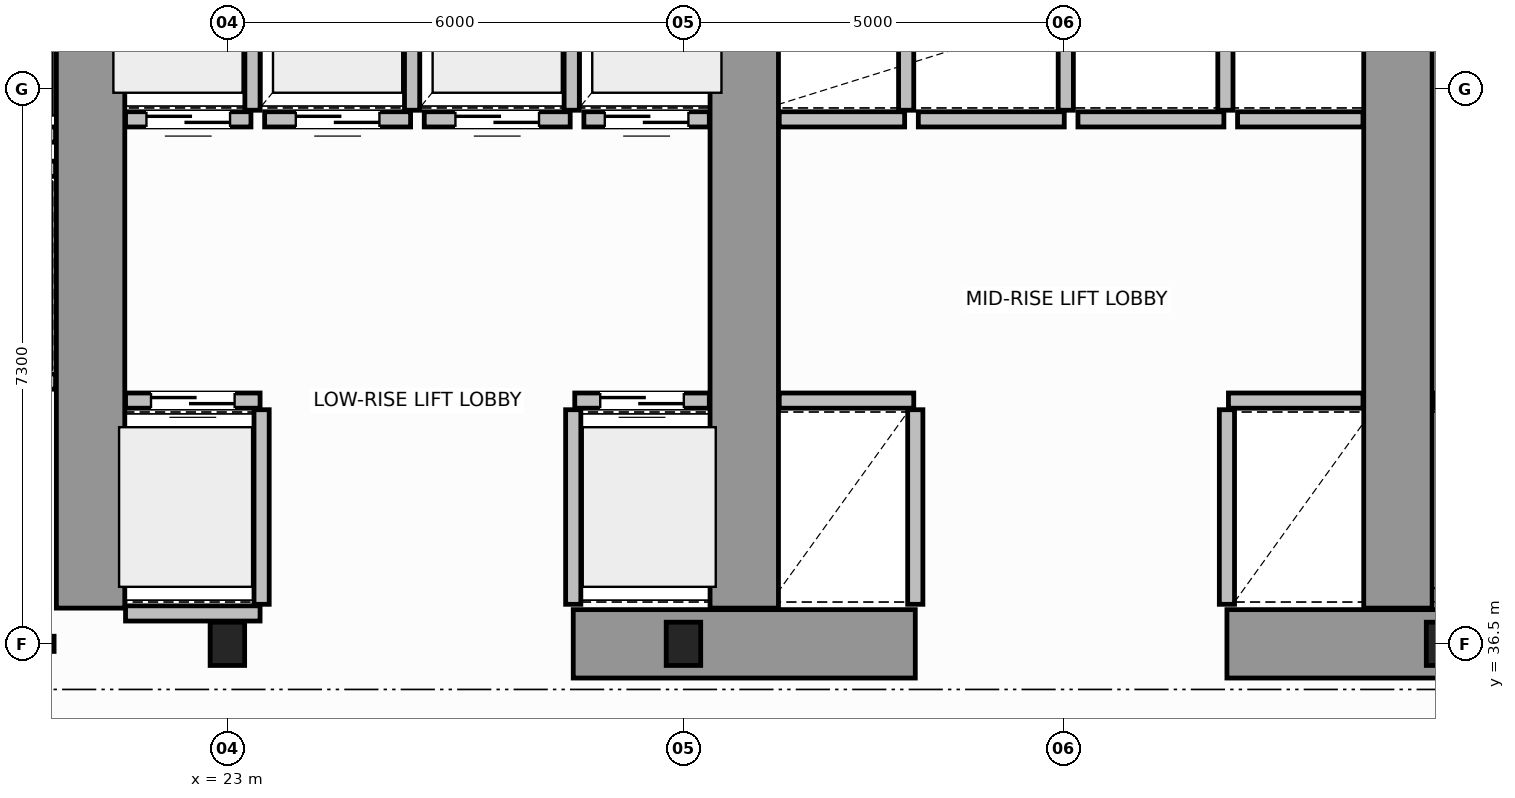
"""IFC4 building model, lengths in metres.
Left out: names, types, materials, properties, quantities, classifications, styles, units other than length and angle.
Written with IfcOpenShell. Run it as: python <this file> out.ifc"""

import sys

from ifc_helpers import new_model, si_unit, direction, frame, frame_2d, origin, origin_2d, place, context, subcontext, project, spatial, rectangle, i_section, extrude, source, transform, mapped, element, fill, save


model = new_model("IFC4")
c1 = context("Model", 3, precision=1e-05, world=origin(), true_north=direction((0.0, 1.0)))
c2 = subcontext(c1, "Body", "Model", "MODEL_VIEW")
j1 = project(units=[si_unit("LENGTHUNIT", "METRE"), si_unit("PLANEANGLEUNIT", "RADIAN")], contexts=[c1])
p1 = place(None, origin())
s1 = spatial("IfcSite", under=j1, at=p1, CompositionType="ELEMENT")
p2 = place(p1, origin())
s2 = spatial("IfcBuilding", under=s1, at=p2, CompositionType="ELEMENT")
p3 = place(p2, frame((0.0, 0.0, 26.4)))
s3 = spatial("IfcBuildingStorey", under=s2, at=p3, CompositionType="ELEMENT", Elevation=26.4)
m1 = source(origin(), c2, "Body", "SweptSolid", [
    extrude(i_section(OverallWidth=0.454, OverallDepth=0.569, WebThickness=0.078, FlangeThickness=0.08, FilletRadius=0.015, at=origin_2d()), origin(), (0.0, 0.0, 1.0), 3.8),
])
for number, where, z_axis, x_axis in (
    (1, (23.0, 36.5, 0.0), (0.0, 0.0, 1.0), (1.0, 0.0, 0.0)),
    (2, (29.0, 36.5, 0.0), (0.0, 0.0, 1.0), (1.0, 0.0, 0.0)),
    (3, (39.0, 36.5, 0.0), (0.0, 0.0, 1.0), (1.0, 0.0, 0.0)),
):
    element("IfcColumn", number, at=place(p3, frame(where, z_axis=z_axis, x_axis=x_axis)), inside=s3, PredefinedType="COLUMN", context=c2, shape_type="MappedRepresentation", body=[
        mapped(m1, transform((0.0, 0.0, 0.0), scale=1.0)),
    ])
for number, where, z_axis, x_axis in (
    (4, (27.55, 36.5, 0.0), (0.0, 0.0, 1.0), (1.0, 0.0, 0.0)),
    (5, (36.15, 36.5, 0.0), (0.0, 0.0, 1.0), (1.0, 0.0, 0.0)),
):
    element("IfcWall", number, at=place(p3, frame(where, z_axis=z_axis, x_axis=x_axis)), inside=s3, PredefinedType="SHEAR", context=c2, shape_type="SweptSolid", body=[
        extrude(rectangle(XDim=4.5, YDim=0.9, at=frame_2d((2.25, 0.0))), origin(), (0.0, 0.0, 1.0), 3.8),
    ])
for number, where, z_axis, x_axis in (
    (6, (21.2, 36.97, 0.0), (0.0, 0.0, 1.0), (0.0, 1.0, 0.0)),
    (7, (29.8, 36.97, 0.0), (0.0, 0.0, 1.0), (0.0, 1.0, 0.0)),
    (8, (38.4, 36.97, 0.0), (0.0, 0.0, 1.0), (0.0, 1.0, 0.0)),
):
    element("IfcWall", number, at=place(p3, frame(where, z_axis=z_axis, x_axis=x_axis)), inside=s3, PredefinedType="SHEAR", context=c2, shape_type="SweptSolid", body=[
        extrude(rectangle(XDim=9.23, YDim=0.9, at=frame_2d((4.615, 0.0))), origin(), (0.0, 0.0, 1.0), 3.8),
    ])
p4 = place(p3, frame((18.25, 36.5, 0.0), z_axis=(0.0, 0.0, 1.0), x_axis=(1.0, 0.0, 0.0)))
e9 = element("IfcWall", 9, at=p4, inside=s3, PredefinedType="SOLIDWALL", context=c2, shape_type="SweptSolid", body=[
    extrude(rectangle(XDim=2.47, YDim=0.2, at=frame_2d((1.235, 0.0))), origin(), (0.0, 0.0, 1.0), 2.37),
])
p5 = place(p4, frame((0.65, 0.0, 0.0)))
e10 = element("IfcOpeningElement", 10, at=p5, cuts=e9, PredefinedType="OPENING", context=c2, shape_type="SweptSolid", body=[
    extrude(rectangle(XDim=1.1, YDim=2.15, at=frame_2d((0.55, 1.075))), frame((0.0, 0.11, 0.0), z_axis=(0.0, -1.0, 0.0), x_axis=(1.0, 0.0, 0.0)), (0.0, 0.0, 1.0), 0.22),
])
p6 = place(p3, frame((21.66, 39.7, 0.0), z_axis=(0.0, 0.0, 1.0), x_axis=(1.0, 0.0, 0.0)))
e11 = element("IfcWall", 11, at=p6, inside=s3, PredefinedType="SOLIDWALL", context=c2, shape_type="SweptSolid", body=[
    extrude(rectangle(XDim=1.77, YDim=0.2, at=frame_2d((0.885, 0.0))), origin(), (0.0, 0.0, 1.0), 3.58),
])
p7 = place(p6, frame((0.335, 0.0, 0.0)))
e12 = element("IfcOpeningElement", 12, at=p7, cuts=e11, PredefinedType="OPENING", context=c2, shape_type="SweptSolid", body=[
    extrude(rectangle(XDim=1.1, YDim=2.15, at=frame_2d((0.55, 1.075))), frame((0.0, 0.11, 0.0), z_axis=(0.0, -1.0, 0.0), x_axis=(1.0, 0.0, 0.0)), (0.0, 0.0, 1.0), 0.22),
])
p8 = place(p3, frame((21.66, 36.9, 0.0), z_axis=(0.0, 0.0, 1.0), x_axis=(1.0, 0.0, 0.0)))
e13 = element("IfcWall", 13, at=p8, inside=s3, PredefinedType="SOLIDWALL", context=c2, shape_type="SweptSolid", body=[
    extrude(rectangle(XDim=1.77, YDim=0.2, at=frame_2d((0.885, 0.0))), origin(), (0.0, 0.0, 1.0), 2.37),
])
p9 = place(p3, frame((23.45, 37.02, 0.0), z_axis=(0.0, 0.0, 1.0), x_axis=(0.0, 1.0, 0.0)))
e14 = element("IfcWall", 14, at=p9, inside=s3, PredefinedType="SOLIDWALL", context=c2, shape_type="SweptSolid", body=[
    extrude(rectangle(XDim=2.56, YDim=0.2, at=frame_2d((1.28, 0.0))), origin(), (0.0, 0.0, 1.0), 3.58),
])
p10 = place(p3, frame((27.57, 39.7, 0.0), z_axis=(0.0, 0.0, 1.0), x_axis=(1.0, 0.0, 0.0)))
e15 = element("IfcWall", 15, at=p10, inside=s3, PredefinedType="SOLIDWALL", context=c2, shape_type="SweptSolid", body=[
    extrude(rectangle(XDim=1.77, YDim=0.2, at=frame_2d((0.885, 0.0))), origin(), (0.0, 0.0, 1.0), 3.58),
])
p11 = place(p10, frame((0.335, 0.0, 0.0)))
e16 = element("IfcOpeningElement", 16, at=p11, cuts=e15, PredefinedType="OPENING", context=c2, shape_type="SweptSolid", body=[
    extrude(rectangle(XDim=1.1, YDim=2.15, at=frame_2d((0.55, 1.075))), frame((0.0, 0.11, 0.0), z_axis=(0.0, -1.0, 0.0), x_axis=(1.0, 0.0, 0.0)), (0.0, 0.0, 1.0), 0.22),
])
p12 = place(p3, frame((27.55, 37.02, 0.0), z_axis=(0.0, 0.0, 1.0), x_axis=(0.0, 1.0, 0.0)))
e17 = element("IfcWall", 17, at=p12, inside=s3, PredefinedType="SOLIDWALL", context=c2, shape_type="SweptSolid", body=[
    extrude(rectangle(XDim=2.56, YDim=0.2, at=frame_2d((1.28, 0.0))), origin(), (0.0, 0.0, 1.0), 3.58),
])
p13 = place(p3, frame((21.66, 43.4, 0.0), z_axis=(0.0, 0.0, 1.0), x_axis=(1.0, 0.0, 0.0)))
e18 = element("IfcWall", 18, at=p13, inside=s3, PredefinedType="SOLIDWALL", context=c2, shape_type="SweptSolid", body=[
    extrude(rectangle(XDim=1.65, YDim=0.2, at=frame_2d((0.825, 0.0))), origin(), (0.0, 0.0, 1.0), 3.58),
])
p14 = place(p13, frame((0.275, 0.0, 0.0)))
e19 = element("IfcOpeningElement", 19, at=p14, cuts=e18, PredefinedType="OPENING", context=c2, shape_type="SweptSolid", body=[
    extrude(rectangle(XDim=1.1, YDim=2.15, at=frame_2d((0.55, 1.075))), frame((0.0, 0.11, 0.0), z_axis=(0.0, -1.0, 0.0), x_axis=(1.0, 0.0, 0.0)), (0.0, 0.0, 1.0), 0.22),
])
p15 = place(p3, frame((23.33, 43.52, 0.0), z_axis=(0.0, 0.0, 1.0), x_axis=(0.0, 1.0, 0.0)))
e20 = element("IfcWall", 20, at=p15, inside=s3, PredefinedType="SOLIDWALL", context=c2, shape_type="SweptSolid", body=[
    extrude(rectangle(XDim=2.56, YDim=0.2, at=frame_2d((1.28, 0.0))), origin(), (0.0, 0.0, 1.0), 3.58),
])
p16 = place(p3, frame((23.49, 43.4, 0.0), z_axis=(0.0, 0.0, 1.0), x_axis=(1.0, 0.0, 0.0)))
e21 = element("IfcWall", 21, at=p16, inside=s3, PredefinedType="SOLIDWALL", context=c2, shape_type="SweptSolid", body=[
    extrude(rectangle(XDim=1.92, YDim=0.2, at=frame_2d((0.96, 0.0))), origin(), (0.0, 0.0, 1.0), 3.58),
])
p17 = place(p16, frame((0.41, 0.0, 0.0)))
e22 = element("IfcOpeningElement", 22, at=p17, cuts=e21, PredefinedType="OPENING", context=c2, shape_type="SweptSolid", body=[
    extrude(rectangle(XDim=1.1, YDim=2.15, at=frame_2d((0.55, 1.075))), frame((0.0, 0.11, 0.0), z_axis=(0.0, -1.0, 0.0), x_axis=(1.0, 0.0, 0.0)), (0.0, 0.0, 1.0), 0.22),
])
p18 = place(p3, frame((25.43, 43.52, 0.0), z_axis=(0.0, 0.0, 1.0), x_axis=(0.0, 1.0, 0.0)))
e23 = element("IfcWall", 23, at=p18, inside=s3, PredefinedType="SOLIDWALL", context=c2, shape_type="SweptSolid", body=[
    extrude(rectangle(XDim=2.56, YDim=0.2, at=frame_2d((1.28, 0.0))), origin(), (0.0, 0.0, 1.0), 3.58),
])
p19 = place(p3, frame((25.59, 43.4, 0.0), z_axis=(0.0, 0.0, 1.0), x_axis=(1.0, 0.0, 0.0)))
e24 = element("IfcWall", 24, at=p19, inside=s3, PredefinedType="SOLIDWALL", context=c2, shape_type="SweptSolid", body=[
    extrude(rectangle(XDim=1.92, YDim=0.2, at=frame_2d((0.96, 0.0))), origin(), (0.0, 0.0, 1.0), 3.58),
])
p20 = place(p19, frame((0.41, 0.0, 0.0)))
e25 = element("IfcOpeningElement", 25, at=p20, cuts=e24, PredefinedType="OPENING", context=c2, shape_type="SweptSolid", body=[
    extrude(rectangle(XDim=1.1, YDim=2.15, at=frame_2d((0.55, 1.075))), frame((0.0, 0.11, 0.0), z_axis=(0.0, -1.0, 0.0), x_axis=(1.0, 0.0, 0.0)), (0.0, 0.0, 1.0), 0.22),
])
p21 = place(p3, frame((27.53, 43.52, 0.0), z_axis=(0.0, 0.0, 1.0), x_axis=(0.0, 1.0, 0.0)))
e26 = element("IfcWall", 26, at=p21, inside=s3, PredefinedType="SOLIDWALL", context=c2, shape_type="SweptSolid", body=[
    extrude(rectangle(XDim=2.56, YDim=0.2, at=frame_2d((1.28, 0.0))), origin(), (0.0, 0.0, 1.0), 3.58),
])
p22 = place(p3, frame((27.69, 43.4, 0.0), z_axis=(0.0, 0.0, 1.0), x_axis=(1.0, 0.0, 0.0)))
e27 = element("IfcWall", 27, at=p22, inside=s3, PredefinedType="SOLIDWALL", context=c2, shape_type="SweptSolid", body=[
    extrude(rectangle(XDim=1.65, YDim=0.2, at=frame_2d((0.825, 0.0))), origin(), (0.0, 0.0, 1.0), 3.58),
])
p23 = place(p22, frame((0.275, 0.0, 0.0)))
e28 = element("IfcOpeningElement", 28, at=p23, cuts=e27, PredefinedType="OPENING", context=c2, shape_type="SweptSolid", body=[
    extrude(rectangle(XDim=1.1, YDim=2.15, at=frame_2d((0.55, 1.075))), frame((0.0, 0.11, 0.0), z_axis=(0.0, -1.0, 0.0), x_axis=(1.0, 0.0, 0.0)), (0.0, 0.0, 1.0), 0.22),
])
p24 = place(p3, frame((30.26, 39.7, 0.0), z_axis=(0.0, 0.0, 1.0), x_axis=(1.0, 0.0, 0.0)))
e29 = element("IfcWall", 29, at=p24, inside=s3, PredefinedType="SOLIDWALL", context=c2, shape_type="SweptSolid", body=[
    extrude(rectangle(XDim=1.77, YDim=0.2, at=frame_2d((0.885, 0.0))), origin(), (0.0, 0.0, 1.0), 3.58),
])
p25 = place(p3, frame((32.05, 37.02, 0.0), z_axis=(0.0, 0.0, 1.0), x_axis=(0.0, 1.0, 0.0)))
e30 = element("IfcWall", 30, at=p25, inside=s3, PredefinedType="SOLIDWALL", context=c2, shape_type="SweptSolid", body=[
    extrude(rectangle(XDim=2.56, YDim=0.2, at=frame_2d((1.28, 0.0))), origin(), (0.0, 0.0, 1.0), 3.58),
])
p26 = place(p3, frame((36.17, 39.7, 0.0), z_axis=(0.0, 0.0, 1.0), x_axis=(1.0, 0.0, 0.0)))
e31 = element("IfcWall", 31, at=p26, inside=s3, PredefinedType="SOLIDWALL", context=c2, shape_type="SweptSolid", body=[
    extrude(rectangle(XDim=1.77, YDim=0.2, at=frame_2d((0.885, 0.0))), origin(), (0.0, 0.0, 1.0), 3.58),
])
p27 = place(p3, frame((36.15, 37.02, 0.0), z_axis=(0.0, 0.0, 1.0), x_axis=(0.0, 1.0, 0.0)))
e32 = element("IfcWall", 32, at=p27, inside=s3, PredefinedType="SOLIDWALL", context=c2, shape_type="SweptSolid", body=[
    extrude(rectangle(XDim=2.56, YDim=0.2, at=frame_2d((1.28, 0.0))), origin(), (0.0, 0.0, 1.0), 3.58),
])
p28 = place(p3, frame((30.26, 43.4, 0.0), z_axis=(0.0, 0.0, 1.0), x_axis=(1.0, 0.0, 0.0)))
e33 = element("IfcWall", 33, at=p28, inside=s3, PredefinedType="SOLIDWALL", context=c2, shape_type="SweptSolid", body=[
    extrude(rectangle(XDim=1.65, YDim=0.2, at=frame_2d((0.825, 0.0))), origin(), (0.0, 0.0, 1.0), 3.58),
])
p29 = place(p3, frame((31.93, 43.52, 0.0), z_axis=(0.0, 0.0, 1.0), x_axis=(0.0, 1.0, 0.0)))
e34 = element("IfcWall", 34, at=p29, inside=s3, PredefinedType="SOLIDWALL", context=c2, shape_type="SweptSolid", body=[
    extrude(rectangle(XDim=2.56, YDim=0.2, at=frame_2d((1.28, 0.0))), origin(), (0.0, 0.0, 1.0), 3.58),
])
p30 = place(p3, frame((32.09, 43.4, 0.0), z_axis=(0.0, 0.0, 1.0), x_axis=(1.0, 0.0, 0.0)))
e35 = element("IfcWall", 35, at=p30, inside=s3, PredefinedType="SOLIDWALL", context=c2, shape_type="SweptSolid", body=[
    extrude(rectangle(XDim=1.92, YDim=0.2, at=frame_2d((0.96, 0.0))), origin(), (0.0, 0.0, 1.0), 3.58),
])
p31 = place(p3, frame((34.03, 43.52, 0.0), z_axis=(0.0, 0.0, 1.0), x_axis=(0.0, 1.0, 0.0)))
e36 = element("IfcWall", 36, at=p31, inside=s3, PredefinedType="SOLIDWALL", context=c2, shape_type="SweptSolid", body=[
    extrude(rectangle(XDim=2.56, YDim=0.2, at=frame_2d((1.28, 0.0))), origin(), (0.0, 0.0, 1.0), 3.58),
])
p32 = place(p3, frame((34.19, 43.4, 0.0), z_axis=(0.0, 0.0, 1.0), x_axis=(1.0, 0.0, 0.0)))
e37 = element("IfcWall", 37, at=p32, inside=s3, PredefinedType="SOLIDWALL", context=c2, shape_type="SweptSolid", body=[
    extrude(rectangle(XDim=1.92, YDim=0.2, at=frame_2d((0.96, 0.0))), origin(), (0.0, 0.0, 1.0), 3.58),
])
p33 = place(p3, frame((36.13, 43.52, 0.0), z_axis=(0.0, 0.0, 1.0), x_axis=(0.0, 1.0, 0.0)))
e38 = element("IfcWall", 38, at=p33, inside=s3, PredefinedType="SOLIDWALL", context=c2, shape_type="SweptSolid", body=[
    extrude(rectangle(XDim=2.56, YDim=0.2, at=frame_2d((1.28, 0.0))), origin(), (0.0, 0.0, 1.0), 3.58),
])
p34 = place(p3, frame((36.29, 43.4, 0.0), z_axis=(0.0, 0.0, 1.0), x_axis=(1.0, 0.0, 0.0)))
e39 = element("IfcWall", 39, at=p34, inside=s3, PredefinedType="SOLIDWALL", context=c2, shape_type="SweptSolid", body=[
    extrude(rectangle(XDim=1.65, YDim=0.2, at=frame_2d((0.825, 0.0))), origin(), (0.0, 0.0, 1.0), 3.58),
])
p35 = place(p3, frame((38.86, 39.7, 0.0), z_axis=(0.0, 0.0, 1.0), x_axis=(1.0, 0.0, 0.0)))
e40 = element("IfcWall", 40, at=p35, inside=s3, PredefinedType="SOLIDWALL", context=c2, shape_type="SweptSolid", body=[
    extrude(rectangle(XDim=1.77, YDim=0.2, at=frame_2d((0.885, 0.0))), origin(), (0.0, 0.0, 1.0), 3.58),
])
p36 = place(p3, frame((18.67, 43.2, 0.0), z_axis=(0.0, 0.0, 1.0), x_axis=(1.0, 0.0, 0.0)))
e41 = element("IfcWall", 41, at=p36, inside=s3, PredefinedType="SOLIDWALL", context=c2, shape_type="SweptSolid", body=[
    extrude(rectangle(XDim=2.07, YDim=0.2, at=frame_2d((1.035, 0.0))), origin(), (0.0, 0.0, 1.0), 3.58),
])
p37 = place(p3, frame((18.67, 39.95, 0.0), z_axis=(0.0, 0.0, 1.0), x_axis=(1.0, 0.0, 0.0)))
e42 = element("IfcWall", 42, at=p37, inside=s3, PredefinedType="SOLIDWALL", context=c2, shape_type="SweptSolid", body=[
    extrude(rectangle(XDim=2.07, YDim=0.2, at=frame_2d((1.035, 0.0))), origin(), (0.0, 0.0, 1.0), 3.58),
])
p38 = place(p37, frame((0.485, 0.0, 0.0)))
e43 = element("IfcOpeningElement", 43, at=p38, cuts=e42, PredefinedType="OPENING", context=c2, shape_type="SweptSolid", body=[
    extrude(rectangle(XDim=1.1, YDim=2.15, at=frame_2d((0.55, 1.075))), frame((0.0, 0.11, 0.0), z_axis=(0.0, -1.0, 0.0), x_axis=(1.0, 0.0, 0.0)), (0.0, 0.0, 1.0), 0.22),
])
p39 = place(p3, frame((18.67, 42.75, 0.0), z_axis=(0.0, 0.0, 1.0), x_axis=(1.0, 0.0, 0.0)))
e44 = element("IfcWall", 44, at=p39, inside=s3, PredefinedType="SOLIDWALL", context=c2, shape_type="SweptSolid", body=[
    extrude(rectangle(XDim=2.07, YDim=0.2, at=frame_2d((1.035, 0.0))), origin(), (0.0, 0.0, 1.0), 3.58),
])
m2 = source(origin(), c2, "Body", "SweptSolid", [
    extrude(rectangle(XDim=1.1, YDim=2.15, at=frame_2d((0.55, 1.075))), frame((0.0, 0.025, 0.0), z_axis=(0.0, -1.0, 0.0), x_axis=(1.0, 0.0, 0.0)), (0.0, 0.0, 1.0), 0.05),
])
p40 = place(p7, origin())
e45 = element("IfcDoor", 45, at=p40, inside=s3, OperationType="DOUBLE_DOOR_SLIDING", PredefinedType="DOOR", context=c2, shape_type="MappedRepresentation", body=[
    mapped(m2, transform((0.0, 0.0, 0.0), scale=1.0)),
])
fill(e12, e45)
p41 = place(p11, origin())
e46 = element("IfcDoor", 46, at=p41, inside=s3, OperationType="DOUBLE_DOOR_SLIDING", PredefinedType="DOOR", context=c2, shape_type="MappedRepresentation", body=[
    mapped(m2, transform((0.0, 0.0, 0.0), scale=1.0)),
])
fill(e16, e46)
p42 = place(p14, origin())
e47 = element("IfcDoor", 47, at=p42, inside=s3, OperationType="DOUBLE_DOOR_SLIDING", PredefinedType="DOOR", context=c2, shape_type="MappedRepresentation", body=[
    mapped(m2, transform((0.0, 0.0, 0.0), scale=1.0)),
])
fill(e19, e47)
p43 = place(p17, origin())
e48 = element("IfcDoor", 48, at=p43, inside=s3, OperationType="DOUBLE_DOOR_SLIDING", PredefinedType="DOOR", context=c2, shape_type="MappedRepresentation", body=[
    mapped(m2, transform((0.0, 0.0, 0.0), scale=1.0)),
])
fill(e22, e48)
p44 = place(p20, origin())
e49 = element("IfcDoor", 49, at=p44, inside=s3, OperationType="DOUBLE_DOOR_SLIDING", PredefinedType="DOOR", context=c2, shape_type="MappedRepresentation", body=[
    mapped(m2, transform((0.0, 0.0, 0.0), scale=1.0)),
])
fill(e25, e49)
p45 = place(p23, origin())
e50 = element("IfcDoor", 50, at=p45, inside=s3, OperationType="DOUBLE_DOOR_SLIDING", PredefinedType="DOOR", context=c2, shape_type="MappedRepresentation", body=[
    mapped(m2, transform((0.0, 0.0, 0.0), scale=1.0)),
])
fill(e28, e50)
save(model, sys.argv[1])
